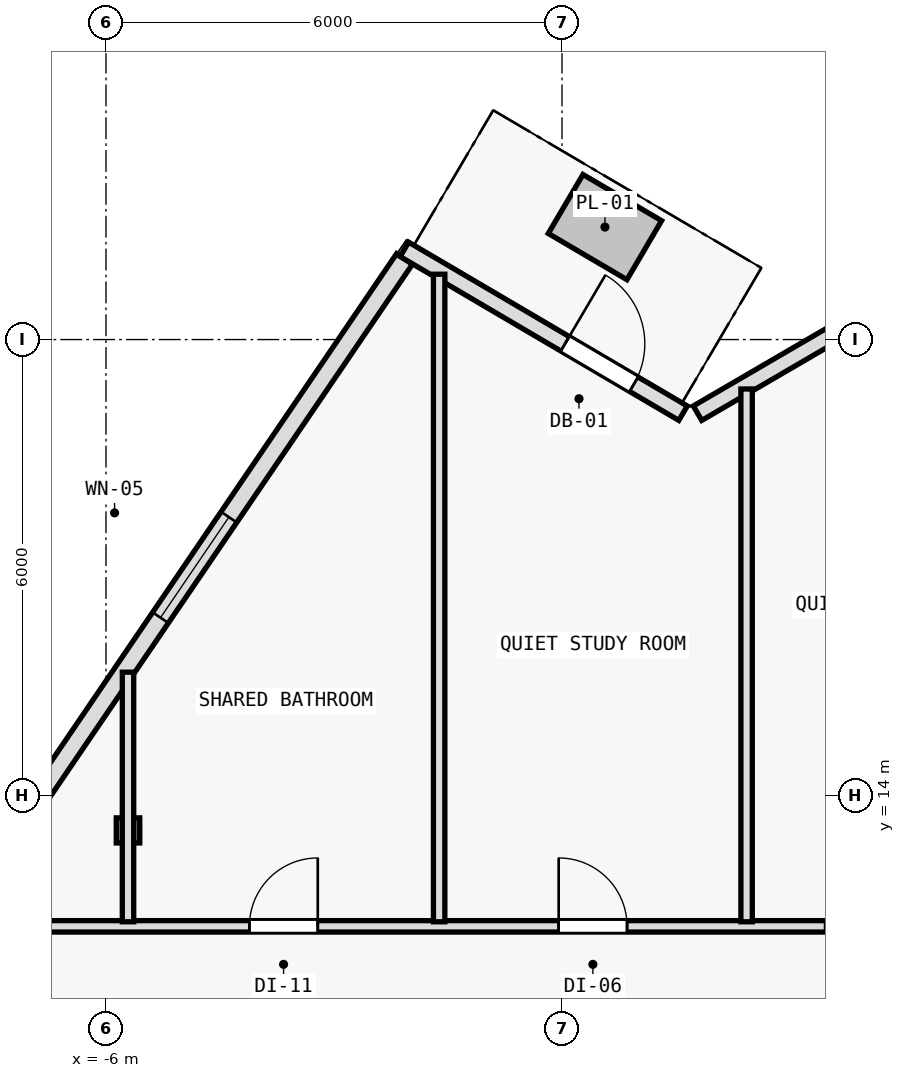
"""IFC4 building model, lengths in metres.
Left out: names, types, materials, properties, quantities, classifications, styles, units other than length and angle.
Written with IfcOpenShell. Run it as: python <this file> out.ifc"""

import sys

from ifc_helpers import new_model, si_unit, direction, frame, frame_2d, origin, origin_2d, place, context, subcontext, project, spatial, rectangle, i_section, extrude, element, fill, save


model = new_model("IFC4")
c1 = context("Model", 3, precision=1e-05, world=origin(), true_north=direction((0.0, 1.0)))
c2 = subcontext(c1, "Body", "Model", "MODEL_VIEW")
j1 = project(units=[si_unit("LENGTHUNIT", "METRE"), si_unit("PLANEANGLEUNIT", "RADIAN")], contexts=[c1])
p1 = place(None, origin())
s1 = spatial("IfcSite", under=j1, at=p1, CompositionType="ELEMENT")
p2 = place(p1, origin())
s2 = spatial("IfcBuilding", under=s1, at=p2, CompositionType="ELEMENT")
p3 = place(p2, frame((0.0, 0.0, 294.0)))
s3 = spatial("IfcBuildingStorey", under=s2, at=p3, CompositionType="ELEMENT", Elevation=294.0)
p4 = place(p3, frame((-5.71, 13.542, 0.006), z_axis=(0.0, 0.0, 1.0), x_axis=(1.0, 0.0, 0.0)))
e1 = element("IfcColumn", 1, at=p4, inside=s3, PredefinedType="COLUMN", context=c2, shape_type="SweptSolid", body=[
    extrude(i_section(OverallWidth=0.309, OverallDepth=0.33, WebThickness=0.011, FlangeThickness=0.019, FilletRadius=0.027, at=origin_2d()), origin(), (0.0, 0.0, 1.0), 3.594),
])
p5 = place(p3, frame((-7.593, 12.945, 0.0), z_axis=(0.0, 0.0, 1.0), x_axis=(0.562476003565, 0.826813609838, 0.0)))
e2 = element("IfcWall", 2, at=p5, inside=s3, PredefinedType="SOLIDWALL", context=c2, shape_type="SweptSolid", body=[
    extrude(rectangle(XDim=9.816, YDim=0.25, at=frame_2d((4.908, 0.0))), origin(), (0.0, 0.0, 1.0), 3.34),
])
p6 = place(p5, frame((4.108, 0.0, 0.62)))
e3 = element("IfcOpeningElement", 3, at=p6, cuts=e2, PredefinedType="OPENING", context=c2, shape_type="SweptSolid", body=[
    extrude(rectangle(XDim=1.6, YDim=2.1, at=frame_2d((0.8, 1.05))), frame((0.0, 0.135, 0.0), z_axis=(0.0, -1.0, 0.0), x_axis=(1.0, 0.0, 0.0)), (0.0, 0.0, 1.0), 0.27),
])
p7 = place(p3, frame((1.783, 19.031, 0.0), z_axis=(0.0, 0.0, 1.0), x_axis=(0.863972097652, 0.503539685108, 0.0)))
e4 = element("IfcWall", 4, at=p7, inside=s3, PredefinedType="SOLIDWALL", context=c2, shape_type="SweptSolid", body=[
    extrude(rectangle(XDim=3.849, YDim=0.22, at=frame_2d((1.924, 0.0))), origin(), (0.0, 0.0, 1.0), 3.34),
])
p8 = place(p3, frame((-2.074, 21.186, 0.0), z_axis=(0.0, 0.0, 1.0), x_axis=(0.862137800155, -0.506673872964, 0.0)))
e5 = element("IfcWall", 5, at=p8, inside=s3, PredefinedType="SOLIDWALL", context=c2, shape_type="SweptSolid", body=[
    extrude(rectangle(XDim=4.253, YDim=0.22, at=frame_2d((2.126, 0.0))), origin(), (0.0, 0.0, 1.0), 3.34),
])
p9 = place(p8, frame((2.451, 0.0, 0.0)))
e6 = element("IfcOpeningElement", 6, at=p9, cuts=e5, PredefinedType="OPENING", context=c2, shape_type="SweptSolid", body=[
    extrude(rectangle(XDim=1.05, YDim=2.15, at=frame_2d((0.525, 1.075))), frame((0.0, 0.12, 0.0), z_axis=(0.0, -1.0, 0.0), x_axis=(1.0, 0.0, 0.0)), (0.0, 0.0, 1.0), 0.24),
])
p10 = place(p3, frame((-6.841, 12.28, 0.0), z_axis=(0.0, 0.0, 1.0), x_axis=(1.0, 0.0, 0.0)))
e7 = element("IfcWall", 7, at=p10, inside=s3, PredefinedType="PARTITIONING", context=c2, shape_type="SweptSolid", body=[
    extrude(rectangle(XDim=13.682, YDim=0.15, at=frame_2d((6.841, 0.0))), origin(), (0.0, 0.0, 1.0), 3.005),
])
p11 = place(p10, frame((12.421, 0.0, 0.0)))
e8 = element("IfcOpeningElement", 8, at=p11, cuts=e7, PredefinedType="OPENING", context=c2, shape_type="SweptSolid", body=[
    extrude(rectangle(XDim=0.85, YDim=2.1, at=frame_2d((0.425, 1.05))), frame((0.0, 0.085, 0.0), z_axis=(0.0, -1.0, 0.0), x_axis=(1.0, 0.0, 0.0)), (0.0, 0.0, 1.0), 0.17),
])
p12 = place(p10, frame((10.304, 0.0, 0.0)))
e9 = element("IfcOpeningElement", 9, at=p12, cuts=e7, PredefinedType="OPENING", context=c2, shape_type="SweptSolid", body=[
    extrude(rectangle(XDim=0.9, YDim=2.1, at=frame_2d((0.45, 1.05))), frame((0.0, 0.085, 0.0), z_axis=(0.0, -1.0, 0.0), x_axis=(1.0, 0.0, 0.0)), (0.0, 0.0, 1.0), 0.17),
])
p13 = place(p10, frame((6.797, 0.0, 0.0)))
e10 = element("IfcOpeningElement", 10, at=p13, cuts=e7, PredefinedType="OPENING", context=c2, shape_type="SweptSolid", body=[
    extrude(rectangle(XDim=0.9, YDim=2.1, at=frame_2d((0.45, 1.05))), frame((0.0, 0.085, 0.0), z_axis=(0.0, -1.0, 0.0), x_axis=(1.0, 0.0, 0.0)), (0.0, 0.0, 1.0), 0.17),
])
p14 = place(p10, frame((2.727, 0.0, 0.0)))
e11 = element("IfcOpeningElement", 11, at=p14, cuts=e7, PredefinedType="OPENING", context=c2, shape_type="SweptSolid", body=[
    extrude(rectangle(XDim=0.9, YDim=2.1, at=frame_2d((0.45, 1.05))), frame((0.0, 0.085, 0.0), z_axis=(0.0, -1.0, 0.0), x_axis=(1.0, 0.0, 0.0)), (0.0, 0.0, 1.0), 0.17),
])
p15 = place(p3, frame((-5.71, 12.34, 0.0), z_axis=(0.0, 0.0, 1.0), x_axis=(0.0, 1.0, 0.0)))
e12 = element("IfcWall", 12, at=p15, inside=s3, PredefinedType="PARTITIONING", context=c2, shape_type="SweptSolid", body=[
    extrude(rectangle(XDim=3.284, YDim=0.15, at=frame_2d((1.642, 0.0))), origin(), (0.0, 0.0, 1.0), 3.005),
])
p16 = place(p3, frame((2.429, 12.34, 0.0), z_axis=(0.0, 0.0, 1.0), x_axis=(0.0, 1.0, 0.0)))
e13 = element("IfcWall", 13, at=p16, inside=s3, PredefinedType="PARTITIONING", context=c2, shape_type="SweptSolid", body=[
    extrude(rectangle(XDim=7.01, YDim=0.15, at=frame_2d((3.505, 0.0))), origin(), (0.0, 0.0, 1.0), 3.005),
])
p17 = place(p3, frame((-1.617, 12.34, 0.0), z_axis=(0.0, 0.0, 1.0), x_axis=(0.0, 1.0, 0.0)))
e14 = element("IfcWall", 14, at=p17, inside=s3, PredefinedType="PARTITIONING", context=c2, shape_type="SweptSolid", body=[
    extrude(rectangle(XDim=8.52, YDim=0.15, at=frame_2d((4.26, 0.0))), origin(), (0.0, 0.0, 1.0), 3.005),
])
p18 = place(p6, origin())
e15 = element("IfcWindow", 15, at=p18, inside=s3, PartitioningType="SINGLE_PANEL", PredefinedType="WINDOW", context=c2, shape_type="SweptSolid", body=[
    extrude(rectangle(XDim=1.6, YDim=2.1, at=frame_2d((0.8, 1.05))), frame((0.0, 0.03, 0.0), z_axis=(0.0, -1.0, 0.0), x_axis=(1.0, 0.0, 0.0)), (0.0, 0.0, 1.0), 0.06),
])
fill(e3, e15)
p19 = place(p9, origin())
e16 = element("IfcDoor", 16, at=p19, inside=s3, OperationType="SINGLE_SWING_LEFT", PredefinedType="DOOR", context=c2, shape_type="SweptSolid", body=[
    extrude(rectangle(XDim=1.05, YDim=2.15, at=frame_2d((0.525, 1.075))), frame((0.0, 0.025, 0.0), z_axis=(0.0, -1.0, 0.0), x_axis=(1.0, 0.0, 0.0)), (0.0, 0.0, 1.0), 0.05),
])
fill(e6, e16)
p20 = place(p13, origin())
e17 = element("IfcDoor", 17, at=p20, inside=s3, OperationType="SINGLE_SWING_LEFT", PredefinedType="DOOR", context=c2, shape_type="SweptSolid", body=[
    extrude(rectangle(XDim=0.9, YDim=2.1, at=frame_2d((0.45, 1.05))), frame((0.0, 0.025, 0.0), z_axis=(0.0, -1.0, 0.0), x_axis=(1.0, 0.0, 0.0)), (0.0, 0.0, 1.0), 0.05),
])
fill(e10, e17)
p21 = place(p14, origin())
e18 = element("IfcDoor", 18, at=p21, inside=s3, OperationType="SINGLE_SWING_RIGHT", PredefinedType="DOOR", context=c2, shape_type="SweptSolid", body=[
    extrude(rectangle(XDim=0.9, YDim=2.1, at=frame_2d((0.45, 1.05))), frame((0.0, 0.025, 0.0), z_axis=(0.0, -1.0, 0.0), x_axis=(1.0, 0.0, 0.0)), (0.0, 0.0, 1.0), 0.05),
])
fill(e11, e18)
save(model, sys.argv[1])
